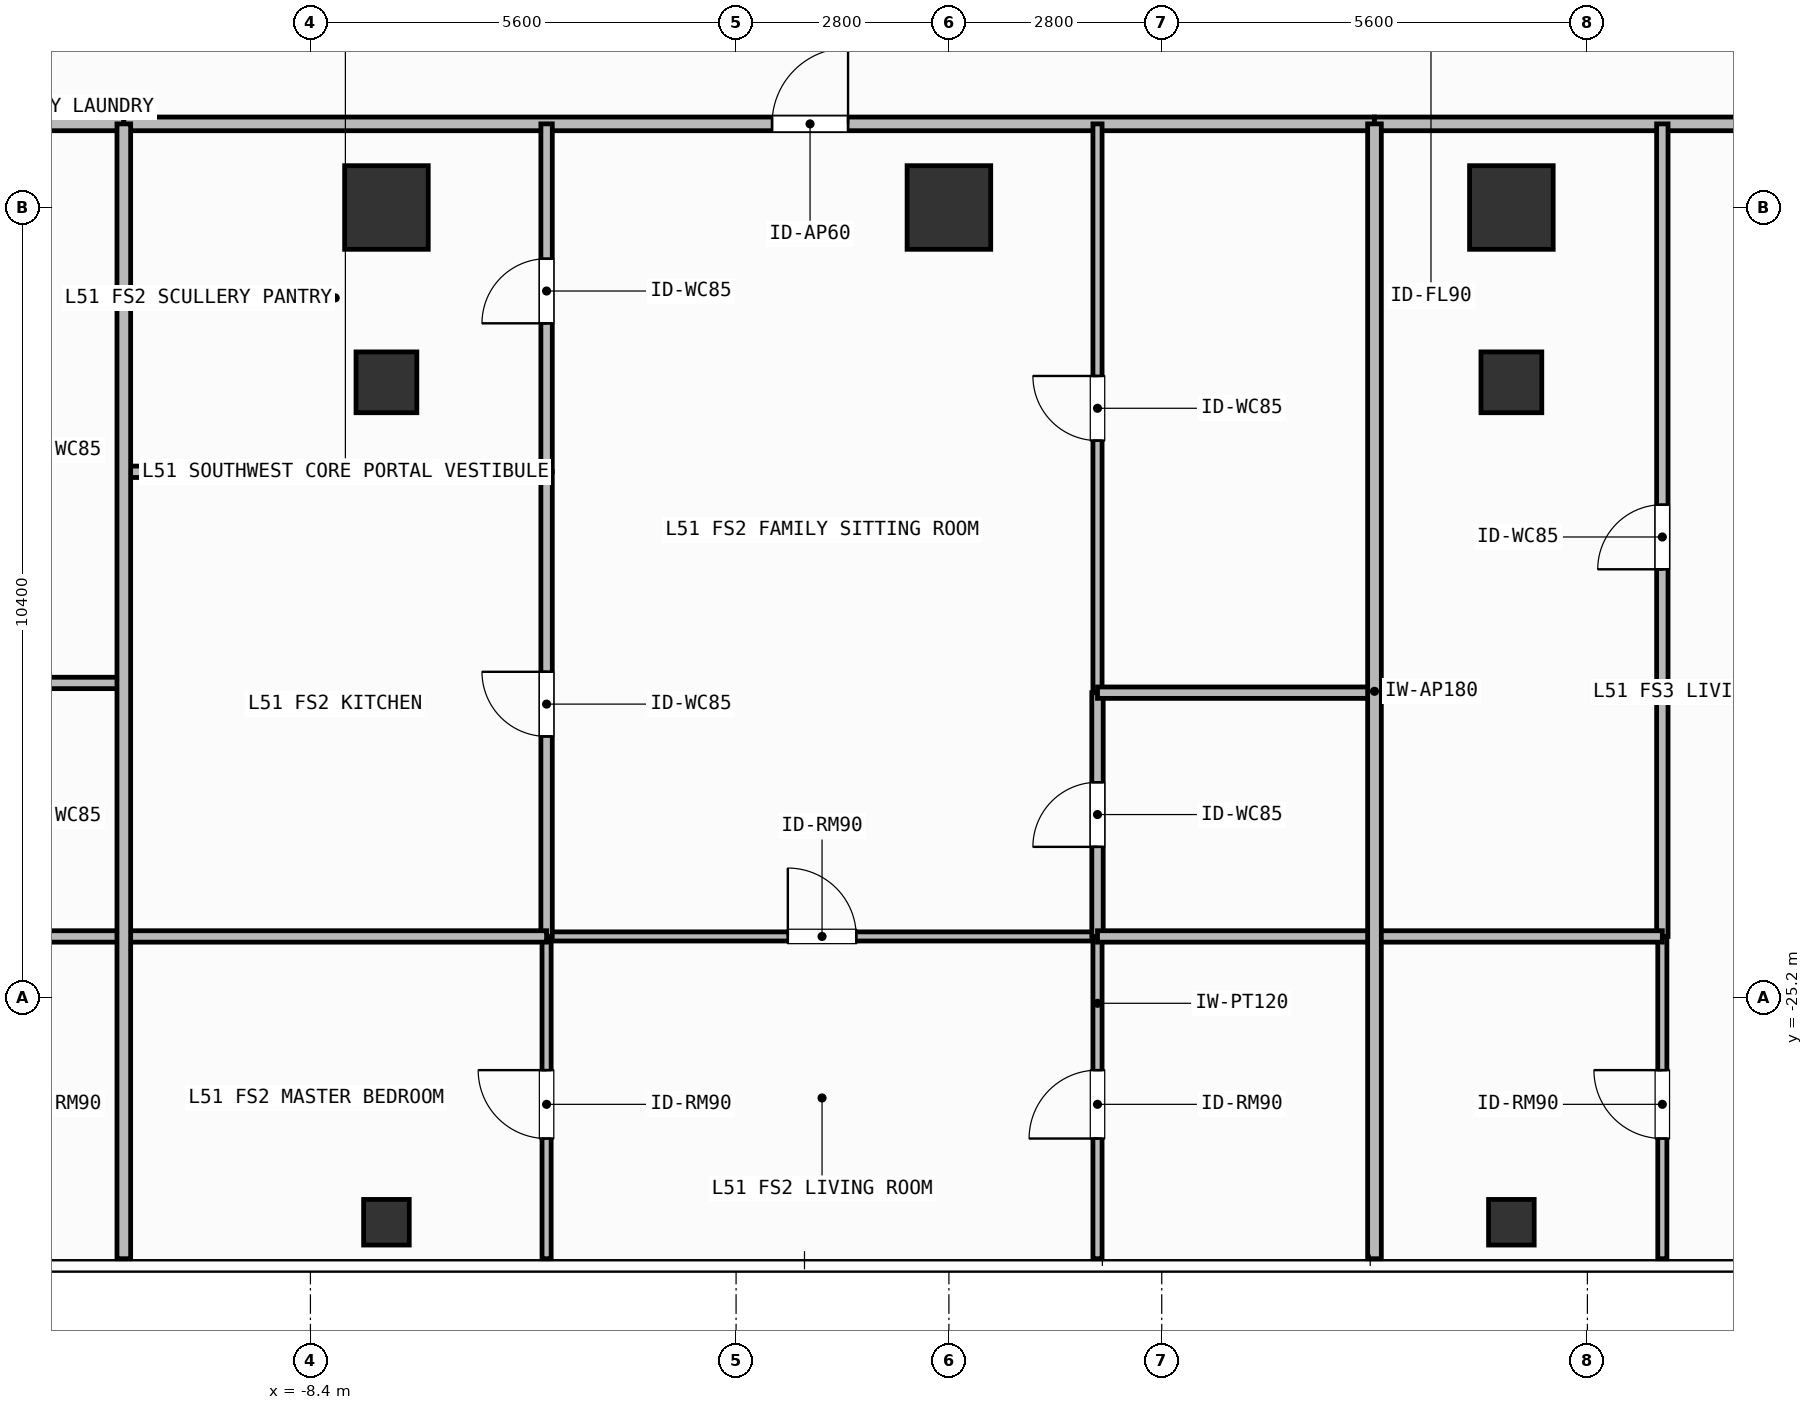
"""IFC4 building model, lengths in metres.
Left out: names, types, materials, properties, quantities, classifications, styles, units other than length and angle.
Written with IfcOpenShell. Run it as: python <this file> out.ifc"""

import sys

from ifc_helpers import new_model, si_unit, direction, frame, frame_2d, origin, origin_2d, place, context, subcontext, project, spatial, rectangle, hollow_rectangle, extrude, element, fill, save


model = new_model("IFC4")
c1 = context("Model", 3, precision=1e-05, world=origin(), true_north=direction((0.0, 1.0)))
c2 = subcontext(c1, "Body", "Model", "MODEL_VIEW")
j1 = project(units=[si_unit("LENGTHUNIT", "METRE"), si_unit("PLANEANGLEUNIT", "RADIAN")], contexts=[c1])
p1 = place(None, origin())
s1 = spatial("IfcSite", under=j1, at=p1, CompositionType="ELEMENT")
p2 = place(p1, origin())
s2 = spatial("IfcBuilding", under=s1, at=p2, CompositionType="ELEMENT")
p3 = place(p2, frame((0.0, 0.0, 207.0)))
s3 = spatial("IfcBuildingStorey", under=s2, at=p3, CompositionType="ELEMENT", Elevation=207.0)
for number, where, z_axis, x_axis in (
    (1, (-7.4, -14.8, 0.0), (0.0, 0.0, 1.0), (1.0, 0.0, 0.0)),
    (2, (0.0, -14.8, 0.0), (0.0, 0.0, 1.0), (1.0, 0.0, 0.0)),
    (3, (7.4, -14.8, 0.0), (0.0, 0.0, 1.0), (1.0, 0.0, 0.0)),
):
    element("IfcColumn", number, at=place(p3, frame(where, z_axis=z_axis, x_axis=x_axis)), inside=s3, PredefinedType="COLUMN", context=c2, shape_type="SweptSolid", body=[
        extrude(rectangle(XDim=1.1, YDim=1.1, at=origin_2d()), origin(), (0.0, 0.0, 1.0), 3.9),
    ])
for number, where, z_axis, x_axis in (
    (4, (-7.4, -17.1, 0.0), (0.0, 0.0, 1.0), (1.0, 0.0, 0.0)),
    (5, (7.4, -17.1, 0.0), (0.0, 0.0, 1.0), (1.0, 0.0, 0.0)),
):
    element("IfcColumn", number, at=place(p3, frame(where, z_axis=z_axis, x_axis=x_axis)), inside=s3, PredefinedType="COLUMN", context=c2, shape_type="SweptSolid", body=[
        extrude(hollow_rectangle(XDim=0.8, YDim=0.8, WallThickness=0.036, at=origin_2d()), origin(), (0.0, 0.0, 1.0), 3.9),
    ])
for number, where, z_axis, x_axis in (
    (6, (-7.4, -28.15, 0.0), (0.0, 0.0, 1.0), (1.0, 0.0, 0.0)),
    (7, (7.4, -28.15, 0.0), (0.0, 0.0, 1.0), (1.0, 0.0, 0.0)),
):
    element("IfcColumn", number, at=place(p3, frame(where, z_axis=z_axis, x_axis=x_axis)), inside=s3, PredefinedType="COLUMN", context=c2, shape_type="SweptSolid", body=[
        extrude(hollow_rectangle(XDim=0.6, YDim=0.6, WallThickness=0.028, at=origin_2d()), origin(), (0.0, 0.0, 1.0), 3.9),
    ])
p4 = place(p3, frame((-20.82, -13.7, 0.0), z_axis=(0.0, 0.0, 1.0), x_axis=(1.0, 0.0, 0.0)))
e8 = element("IfcWall", 8, at=p4, inside=s3, PredefinedType="PARTITIONING", context=c2, shape_type="SweptSolid", body=[
    extrude(rectangle(XDim=9.965, YDim=0.18, at=frame_2d((4.982, 0.0))), origin(), (0.0, 0.0, 1.0), 3.62),
])
p5 = place(p4, frame((4.394, 0.0, 0.0)))
e9 = element("IfcOpeningElement", 9, at=p5, cuts=e8, PredefinedType="OPENING", context=c2, shape_type="SweptSolid", body=[
    extrude(rectangle(XDim=1.0, YDim=2.2, at=frame_2d((0.5, 1.1))), frame((0.0, 0.1, 0.0), z_axis=(0.0, -1.0, 0.0), x_axis=(1.0, 0.0, 0.0)), (0.0, 0.0, 1.0), 0.2),
])
p6 = place(p3, frame((-10.855, -13.7, 0.0), z_axis=(0.0, 0.0, 1.0), x_axis=(1.0, 0.0, 0.0)))
e10 = element("IfcWall", 10, at=p6, inside=s3, PredefinedType="PARTITIONING", context=c2, shape_type="SweptSolid", body=[
    extrude(rectangle(XDim=16.454, YDim=0.18, at=frame_2d((8.227, 0.0))), origin(), (0.0, 0.0, 1.0), 3.62),
])
p7 = place(p6, frame((8.528, 0.0, 0.0)))
e11 = element("IfcOpeningElement", 11, at=p7, cuts=e10, PredefinedType="OPENING", context=c2, shape_type="SweptSolid", body=[
    extrude(rectangle(XDim=1.0, YDim=2.2, at=frame_2d((0.5, 1.1))), frame((0.0, 0.1, 0.0), z_axis=(0.0, -1.0, 0.0), x_axis=(1.0, 0.0, 0.0)), (0.0, 0.0, 1.0), 0.2),
])
p8 = place(p3, frame((-5.293, -24.39, 0.0), z_axis=(0.0, 0.0, 1.0), x_axis=(1.0, 0.0, 0.0)))
e12 = element("IfcWall", 12, at=p8, inside=s3, PredefinedType="PARTITIONING", context=c2, shape_type="SweptSolid", body=[
    extrude(rectangle(XDim=7.248, YDim=0.12, at=frame_2d((3.624, 0.0))), origin(), (0.0, 0.0, 1.0), 3.62),
])
p9 = place(p8, frame((3.174, 0.0, 0.0)))
e13 = element("IfcOpeningElement", 13, at=p9, cuts=e12, PredefinedType="OPENING", context=c2, shape_type="SweptSolid", body=[
    extrude(rectangle(XDim=0.9, YDim=2.1, at=frame_2d((0.45, 1.05))), frame((0.0, 0.07, 0.0), z_axis=(0.0, -1.0, 0.0), x_axis=(1.0, 0.0, 0.0)), (0.0, 0.0, 1.0), 0.14),
])
p10 = place(p3, frame((-5.293, -24.39, 0.0), z_axis=(0.0, 0.0, 1.0), x_axis=(0.0, 1.0, 0.0)))
e14 = element("IfcWall", 14, at=p10, inside=s3, PredefinedType="PARTITIONING", context=c2, shape_type="SweptSolid", body=[
    extrude(rectangle(XDim=6.113, YDim=0.15, at=frame_2d((3.056, 0.0))), origin(), (0.0, 0.0, 1.0), 3.62),
])
p11 = place(p10, frame((2.632, 0.0, 0.0)))
e15 = element("IfcOpeningElement", 15, at=p11, cuts=e14, PredefinedType="OPENING", context=c2, shape_type="SweptSolid", body=[
    extrude(rectangle(XDim=0.85, YDim=2.1, at=frame_2d((0.425, 1.05))), frame((0.0, 0.085, 0.0), z_axis=(0.0, -1.0, 0.0), x_axis=(1.0, 0.0, 0.0)), (0.0, 0.0, 1.0), 0.17),
])
p12 = place(p3, frame((-5.293, -18.277, 0.0), z_axis=(0.0, 0.0, 1.0), x_axis=(0.0, 1.0, 0.0)))
e16 = element("IfcWall", 16, at=p12, inside=s3, PredefinedType="PARTITIONING", context=c2, shape_type="SweptSolid", body=[
    extrude(rectangle(XDim=4.577, YDim=0.15, at=frame_2d((2.289, 0.0))), origin(), (0.0, 0.0, 1.0), 3.62),
])
p13 = place(p12, frame((1.953, 0.0, 0.0)))
e17 = element("IfcOpeningElement", 17, at=p13, cuts=e16, PredefinedType="OPENING", context=c2, shape_type="SweptSolid", body=[
    extrude(rectangle(XDim=0.85, YDim=2.1, at=frame_2d((0.425, 1.05))), frame((0.0, 0.085, 0.0), z_axis=(0.0, -1.0, 0.0), x_axis=(1.0, 0.0, 0.0)), (0.0, 0.0, 1.0), 0.17),
])
p14 = place(p3, frame((-5.293, -28.63, 0.0), z_axis=(0.0, 0.0, 1.0), x_axis=(0.0, 1.0, 0.0)))
e18 = element("IfcWall", 18, at=p14, inside=s3, PredefinedType="PARTITIONING", context=c2, shape_type="SweptSolid", body=[
    extrude(rectangle(XDim=4.24, YDim=0.12, at=frame_2d((2.12, 0.0))), origin(), (0.0, 0.0, 1.0), 3.62),
])
p15 = place(p14, frame((1.581, 0.0, 0.0)))
e19 = element("IfcOpeningElement", 19, at=p15, cuts=e18, PredefinedType="OPENING", context=c2, shape_type="SweptSolid", body=[
    extrude(rectangle(XDim=0.9, YDim=2.1, at=frame_2d((0.45, 1.05))), frame((0.0, 0.07, 0.0), z_axis=(0.0, -1.0, 0.0), x_axis=(1.0, 0.0, 0.0)), (0.0, 0.0, 1.0), 0.14),
])
p16 = place(p3, frame((1.955, -24.39, 0.0), z_axis=(0.0, 0.0, 1.0), x_axis=(0.0, 1.0, 0.0)))
e20 = element("IfcWall", 20, at=p16, inside=s3, PredefinedType="PARTITIONING", context=c2, shape_type="SweptSolid", body=[
    extrude(rectangle(XDim=3.207, YDim=0.15, at=frame_2d((1.604, 0.0))), origin(), (0.0, 0.0, 1.0), 3.62),
])
p17 = place(p16, frame((1.178, 0.0, 0.0)))
e21 = element("IfcOpeningElement", 21, at=p17, cuts=e20, PredefinedType="OPENING", context=c2, shape_type="SweptSolid", body=[
    extrude(rectangle(XDim=0.85, YDim=2.1, at=frame_2d((0.425, 1.05))), frame((0.0, 0.085, 0.0), z_axis=(0.0, -1.0, 0.0), x_axis=(1.0, 0.0, 0.0)), (0.0, 0.0, 1.0), 0.17),
])
p18 = place(p3, frame((1.955, -21.183, 0.0), z_axis=(0.0, 0.0, 1.0), x_axis=(0.0, 1.0, 0.0)))
e22 = element("IfcWall", 22, at=p18, inside=s3, PredefinedType="PARTITIONING", context=c2, shape_type="SweptSolid", body=[
    extrude(rectangle(XDim=7.483, YDim=0.12, at=frame_2d((3.742, 0.0))), origin(), (0.0, 0.0, 1.0), 3.62),
])
p19 = place(p18, frame((3.316, 0.0, 0.0)))
e23 = element("IfcOpeningElement", 23, at=p19, cuts=e22, PredefinedType="OPENING", context=c2, shape_type="SweptSolid", body=[
    extrude(rectangle(XDim=0.85, YDim=2.1, at=frame_2d((0.425, 1.05))), frame((0.0, 0.07, 0.0), z_axis=(0.0, -1.0, 0.0), x_axis=(1.0, 0.0, 0.0)), (0.0, 0.0, 1.0), 0.14),
])
p20 = place(p3, frame((1.955, -28.63, 0.0), z_axis=(0.0, 0.0, 1.0), x_axis=(0.0, 1.0, 0.0)))
e24 = element("IfcWall", 24, at=p20, inside=s3, PredefinedType="PARTITIONING", context=c2, shape_type="SweptSolid", body=[
    extrude(rectangle(XDim=4.24, YDim=0.12, at=frame_2d((2.12, 0.0))), origin(), (0.0, 0.0, 1.0), 3.62),
])
p21 = place(p20, frame((1.581, 0.0, 0.0)))
e25 = element("IfcOpeningElement", 25, at=p21, cuts=e24, PredefinedType="OPENING", context=c2, shape_type="SweptSolid", body=[
    extrude(rectangle(XDim=0.9, YDim=2.1, at=frame_2d((0.45, 1.05))), frame((0.0, 0.07, 0.0), z_axis=(0.0, -1.0, 0.0), x_axis=(1.0, 0.0, 0.0)), (0.0, 0.0, 1.0), 0.14),
])
p22 = place(p3, frame((5.599, -13.7, 0.0), z_axis=(0.0, 0.0, 1.0), x_axis=(1.0, 0.0, 0.0)))
e26 = element("IfcWall", 26, at=p22, inside=s3, PredefinedType="PARTITIONING", context=c2, shape_type="SweptSolid", body=[
    extrude(rectangle(XDim=11.421, YDim=0.18, at=frame_2d((5.71, 0.0))), origin(), (0.0, 0.0, 1.0), 3.62),
])
p23 = place(p22, frame((5.122, 0.0, 0.0)))
e27 = element("IfcOpeningElement", 27, at=p23, cuts=e26, PredefinedType="OPENING", context=c2, shape_type="SweptSolid", body=[
    extrude(rectangle(XDim=1.0, YDim=2.2, at=frame_2d((0.5, 1.1))), frame((0.0, 0.1, 0.0), z_axis=(0.0, -1.0, 0.0), x_axis=(1.0, 0.0, 0.0)), (0.0, 0.0, 1.0), 0.2),
])
p24 = place(p3, frame((9.386, -24.39, 0.0), z_axis=(0.0, 0.0, 1.0), x_axis=(0.0, 1.0, 0.0)))
e28 = element("IfcWall", 28, at=p24, inside=s3, PredefinedType="PARTITIONING", context=c2, shape_type="SweptSolid", body=[
    extrude(rectangle(XDim=10.69, YDim=0.15, at=frame_2d((5.345, 0.0))), origin(), (0.0, 0.0, 1.0), 3.62),
])
p25 = place(p24, frame((4.83, 0.0, 0.0)))
e29 = element("IfcOpeningElement", 29, at=p25, cuts=e28, PredefinedType="OPENING", context=c2, shape_type="SweptSolid", body=[
    extrude(rectangle(XDim=0.85, YDim=2.1, at=frame_2d((0.425, 1.05))), frame((0.0, 0.085, 0.0), z_axis=(0.0, -1.0, 0.0), x_axis=(1.0, 0.0, 0.0)), (0.0, 0.0, 1.0), 0.17),
])
p26 = place(p3, frame((9.386, -28.63, 0.0), z_axis=(0.0, 0.0, 1.0), x_axis=(0.0, 1.0, 0.0)))
e30 = element("IfcWall", 30, at=p26, inside=s3, PredefinedType="PARTITIONING", context=c2, shape_type="SweptSolid", body=[
    extrude(rectangle(XDim=4.24, YDim=0.12, at=frame_2d((2.12, 0.0))), origin(), (0.0, 0.0, 1.0), 3.62),
])
p27 = place(p26, frame((1.581, 0.0, 0.0)))
e31 = element("IfcOpeningElement", 31, at=p27, cuts=e30, PredefinedType="OPENING", context=c2, shape_type="SweptSolid", body=[
    extrude(rectangle(XDim=0.9, YDim=2.1, at=frame_2d((0.45, 1.05))), frame((0.0, 0.07, 0.0), z_axis=(0.0, -1.0, 0.0), x_axis=(1.0, 0.0, 0.0)), (0.0, 0.0, 1.0), 0.14),
])
for number, where, z_axis, x_axis in (
    (32, (-13.584, -21.055, 0.0), (0.0, 0.0, 1.0), (1.0, 0.0, 0.0)),
    (33, (-13.584, -24.39, 0.0), (0.0, 0.0, 1.0), (1.0, 0.0, 0.0)),
):
    element("IfcWall", number, at=place(p3, frame(where, z_axis=z_axis, x_axis=x_axis)), inside=s3, PredefinedType="PARTITIONING", context=c2, shape_type="SweptSolid", body=[
        extrude(rectangle(XDim=2.729, YDim=0.15, at=frame_2d((1.365, 0.0))), origin(), (0.0, 0.0, 1.0), 3.62),
    ])
for number, where, z_axis, x_axis in (
    (34, (-10.855, -18.277, 0.0), (0.0, 0.0, 1.0), (1.0, 0.0, 0.0)),
    (35, (-10.855, -24.39, 0.0), (0.0, 0.0, 1.0), (1.0, 0.0, 0.0)),
):
    element("IfcWall", number, at=place(p3, frame(where, z_axis=z_axis, x_axis=x_axis)), inside=s3, PredefinedType="PARTITIONING", context=c2, shape_type="SweptSolid", body=[
        extrude(rectangle(XDim=5.562, YDim=0.15, at=frame_2d((2.781, 0.0))), origin(), (0.0, 0.0, 1.0), 3.62),
    ])
for number, where, z_axis, x_axis in (
    (36, (1.955, -21.183, 0.0), (0.0, 0.0, 1.0), (1.0, 0.0, 0.0)),
    (37, (1.955, -24.39, 0.0), (0.0, 0.0, 1.0), (1.0, 0.0, 0.0)),
):
    element("IfcWall", number, at=place(p3, frame(where, z_axis=z_axis, x_axis=x_axis)), inside=s3, PredefinedType="PARTITIONING", context=c2, shape_type="SweptSolid", body=[
        extrude(rectangle(XDim=3.644, YDim=0.15, at=frame_2d((1.822, 0.0))), origin(), (0.0, 0.0, 1.0), 3.62),
    ])
p28 = place(p3, frame((-10.855, -28.63, 0.0), z_axis=(0.0, 0.0, 1.0), x_axis=(0.0, 1.0, 0.0)))
e38 = element("IfcWall", 38, at=p28, inside=s3, PredefinedType="PARTITIONING", context=c2, shape_type="SweptSolid", body=[
    extrude(rectangle(XDim=14.93, YDim=0.18, at=frame_2d((7.465, 0.0))), origin(), (0.0, 0.0, 1.0), 3.62),
])
p29 = place(p3, frame((5.599, -24.39, 0.0), z_axis=(0.0, 0.0, 1.0), x_axis=(1.0, 0.0, 0.0)))
e39 = element("IfcWall", 39, at=p29, inside=s3, PredefinedType="PARTITIONING", context=c2, shape_type="SweptSolid", body=[
    extrude(rectangle(XDim=3.787, YDim=0.15, at=frame_2d((1.894, 0.0))), origin(), (0.0, 0.0, 1.0), 3.62),
])
p30 = place(p3, frame((5.599, -28.63, 0.0), z_axis=(0.0, 0.0, 1.0), x_axis=(0.0, 1.0, 0.0)))
e40 = element("IfcWall", 40, at=p30, inside=s3, PredefinedType="PARTITIONING", context=c2, shape_type="SweptSolid", body=[
    extrude(rectangle(XDim=14.93, YDim=0.18, at=frame_2d((7.465, 0.0))), origin(), (0.0, 0.0, 1.0), 3.62),
])
p31 = place(p7, origin())
e41 = element("IfcDoor", 41, at=p31, inside=s3, OperationType="SINGLE_SWING_RIGHT", PredefinedType="DOOR", context=c2, shape_type="SweptSolid", body=[
    extrude(rectangle(XDim=1.0, YDim=2.2, at=frame_2d((0.5, 1.1))), frame((0.0, 0.025, 0.0), z_axis=(0.0, -1.0, 0.0), x_axis=(1.0, 0.0, 0.0)), (0.0, 0.0, 1.0), 0.05),
])
fill(e11, e41)
p32 = place(p9, origin())
e42 = element("IfcDoor", 42, at=p32, inside=s3, OperationType="SINGLE_SWING_LEFT", PredefinedType="DOOR", context=c2, shape_type="SweptSolid", body=[
    extrude(rectangle(XDim=0.9, YDim=2.1, at=frame_2d((0.45, 1.05))), frame((0.0, 0.025, 0.0), z_axis=(0.0, -1.0, 0.0), x_axis=(1.0, 0.0, 0.0)), (0.0, 0.0, 1.0), 0.05),
])
fill(e13, e42)
p33 = place(p11, origin())
e43 = element("IfcDoor", 43, at=p33, inside=s3, OperationType="SINGLE_SWING_RIGHT", PredefinedType="DOOR", context=c2, shape_type="SweptSolid", body=[
    extrude(rectangle(XDim=0.85, YDim=2.1, at=frame_2d((0.425, 1.05))), frame((0.0, 0.025, 0.0), z_axis=(0.0, -1.0, 0.0), x_axis=(1.0, 0.0, 0.0)), (0.0, 0.0, 1.0), 0.05),
])
fill(e15, e43)
p34 = place(p13, origin())
e44 = element("IfcDoor", 44, at=p34, inside=s3, OperationType="SINGLE_SWING_LEFT", PredefinedType="DOOR", context=c2, shape_type="SweptSolid", body=[
    extrude(rectangle(XDim=0.85, YDim=2.1, at=frame_2d((0.425, 1.05))), frame((0.0, 0.025, 0.0), z_axis=(0.0, -1.0, 0.0), x_axis=(1.0, 0.0, 0.0)), (0.0, 0.0, 1.0), 0.05),
])
fill(e17, e44)
p35 = place(p15, origin())
e45 = element("IfcDoor", 45, at=p35, inside=s3, OperationType="SINGLE_SWING_RIGHT", PredefinedType="DOOR", context=c2, shape_type="SweptSolid", body=[
    extrude(rectangle(XDim=0.9, YDim=2.1, at=frame_2d((0.45, 1.05))), frame((0.0, 0.025, 0.0), z_axis=(0.0, -1.0, 0.0), x_axis=(1.0, 0.0, 0.0)), (0.0, 0.0, 1.0), 0.05),
])
fill(e19, e45)
p36 = place(p17, origin())
e46 = element("IfcDoor", 46, at=p36, inside=s3, OperationType="SINGLE_SWING_LEFT", PredefinedType="DOOR", context=c2, shape_type="SweptSolid", body=[
    extrude(rectangle(XDim=0.85, YDim=2.1, at=frame_2d((0.425, 1.05))), frame((0.0, 0.025, 0.0), z_axis=(0.0, -1.0, 0.0), x_axis=(1.0, 0.0, 0.0)), (0.0, 0.0, 1.0), 0.05),
])
fill(e21, e46)
p37 = place(p19, origin())
e47 = element("IfcDoor", 47, at=p37, inside=s3, OperationType="SINGLE_SWING_RIGHT", PredefinedType="DOOR", context=c2, shape_type="SweptSolid", body=[
    extrude(rectangle(XDim=0.85, YDim=2.1, at=frame_2d((0.425, 1.05))), frame((0.0, 0.025, 0.0), z_axis=(0.0, -1.0, 0.0), x_axis=(1.0, 0.0, 0.0)), (0.0, 0.0, 1.0), 0.05),
])
fill(e23, e47)
p38 = place(p21, origin())
e48 = element("IfcDoor", 48, at=p38, inside=s3, OperationType="SINGLE_SWING_LEFT", PredefinedType="DOOR", context=c2, shape_type="SweptSolid", body=[
    extrude(rectangle(XDim=0.9, YDim=2.1, at=frame_2d((0.45, 1.05))), frame((0.0, 0.025, 0.0), z_axis=(0.0, -1.0, 0.0), x_axis=(1.0, 0.0, 0.0)), (0.0, 0.0, 1.0), 0.05),
])
fill(e25, e48)
p39 = place(p25, origin())
e49 = element("IfcDoor", 49, at=p39, inside=s3, OperationType="SINGLE_SWING_LEFT", PredefinedType="DOOR", context=c2, shape_type="SweptSolid", body=[
    extrude(rectangle(XDim=0.85, YDim=2.1, at=frame_2d((0.425, 1.05))), frame((0.0, 0.025, 0.0), z_axis=(0.0, -1.0, 0.0), x_axis=(1.0, 0.0, 0.0)), (0.0, 0.0, 1.0), 0.05),
])
fill(e29, e49)
p40 = place(p27, origin())
e50 = element("IfcDoor", 50, at=p40, inside=s3, OperationType="SINGLE_SWING_RIGHT", PredefinedType="DOOR", context=c2, shape_type="SweptSolid", body=[
    extrude(rectangle(XDim=0.9, YDim=2.1, at=frame_2d((0.45, 1.05))), frame((0.0, 0.025, 0.0), z_axis=(0.0, -1.0, 0.0), x_axis=(1.0, 0.0, 0.0)), (0.0, 0.0, 1.0), 0.05),
])
fill(e31, e50)
save(model, sys.argv[1])
